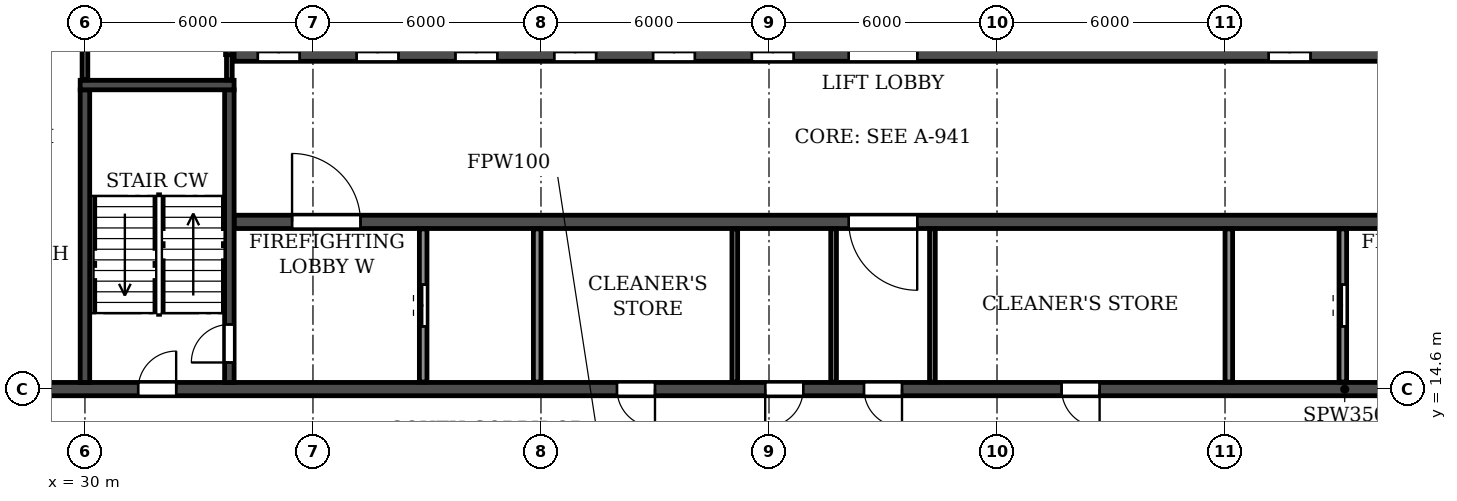
"""IFC4 building model, lengths in metres.
Left out: names, types, materials, properties, quantities, classifications, styles, units other than length and angle.
Written with IfcOpenShell. Run it as: python <this file> out.ifc"""

import sys

from ifc_helpers import new_model, si_unit, direction, frame, frame_2d, origin, place, context, subcontext, project, spatial, rectangle, extrude, element, fill, save


model = new_model("IFC4")
c1 = context("Model", 3, precision=1e-05, world=origin(), true_north=direction((0.0, 1.0)))
c2 = subcontext(c1, "Body", "Model", "MODEL_VIEW")
j1 = project(units=[si_unit("LENGTHUNIT", "METRE"), si_unit("PLANEANGLEUNIT", "RADIAN")], contexts=[c1])
p1 = place(None, origin())
s1 = spatial("IfcSite", under=j1, at=p1, CompositionType="ELEMENT")
p2 = place(p1, origin())
s2 = spatial("IfcBuilding", under=s1, at=p2, CompositionType="ELEMENT")
p3 = place(p2, frame((0.0, 0.0, 241.2)))
s3 = spatial("IfcBuildingStorey", under=s2, at=p3, CompositionType="ELEMENT", Elevation=241.2)
p4 = place(p3, frame((18.2, 14.6, 0.0), z_axis=(0.0, 0.0, 1.0), x_axis=(1.0, 0.0, 0.0)))
e1 = element("IfcWall", 1, at=p4, inside=s3, PredefinedType="SOLIDWALL", context=c2, shape_type="SweptSolid", body=[
    extrude(rectangle(XDim=65.6, YDim=0.35, at=frame_2d((32.8, 0.0))), origin(), (0.0, 0.0, 1.0), 3.08),
])
p5 = place(p4, frame((0.7, 0.0, 0.0)))
e2 = element("IfcOpeningElement", 2, at=p5, cuts=e1, PredefinedType="OPENING", context=c2, shape_type="SweptSolid", body=[
    extrude(rectangle(XDim=1.0, YDim=2.1, at=frame_2d((0.5, 1.05))), frame((0.0, 0.185, 0.0), z_axis=(0.0, -1.0, 0.0), x_axis=(1.0, 0.0, 0.0)), (0.0, 0.0, 1.0), 0.37),
])
p6 = place(p4, frame((8.6, 0.0, 0.0)))
e3 = element("IfcOpeningElement", 3, at=p6, cuts=e1, PredefinedType="OPENING", context=c2, shape_type="SweptSolid", body=[
    extrude(rectangle(XDim=1.0, YDim=2.1, at=frame_2d((0.5, 1.05))), frame((0.0, 0.185, 0.0), z_axis=(0.0, -1.0, 0.0), x_axis=(1.0, 0.0, 0.0)), (0.0, 0.0, 1.0), 0.37),
])
p7 = place(p4, frame((13.2, 0.0, 0.0)))
e4 = element("IfcOpeningElement", 4, at=p7, cuts=e1, PredefinedType="OPENING", context=c2, shape_type="SweptSolid", body=[
    extrude(rectangle(XDim=1.0, YDim=2.1, at=frame_2d((0.5, 1.05))), frame((0.0, 0.185, 0.0), z_axis=(0.0, -1.0, 0.0), x_axis=(1.0, 0.0, 0.0)), (0.0, 0.0, 1.0), 0.37),
])
p8 = place(p4, frame((25.8, 0.0, 0.0)))
e5 = element("IfcOpeningElement", 5, at=p8, cuts=e1, PredefinedType="OPENING", context=c2, shape_type="SweptSolid", body=[
    extrude(rectangle(XDim=1.0, YDim=2.1, at=frame_2d((0.5, 1.05))), frame((0.0, 0.185, 0.0), z_axis=(0.0, -1.0, 0.0), x_axis=(1.0, 0.0, 0.0)), (0.0, 0.0, 1.0), 0.37),
])
p9 = place(p4, frame((29.7, 0.0, 0.0)))
e6 = element("IfcOpeningElement", 6, at=p9, cuts=e1, PredefinedType="OPENING", context=c2, shape_type="SweptSolid", body=[
    extrude(rectangle(XDim=1.0, YDim=2.1, at=frame_2d((0.5, 1.05))), frame((0.0, 0.185, 0.0), z_axis=(0.0, -1.0, 0.0), x_axis=(1.0, 0.0, 0.0)), (0.0, 0.0, 1.0), 0.37),
])
p10 = place(p4, frame((32.3, 0.0, 0.0)))
e7 = element("IfcOpeningElement", 7, at=p10, cuts=e1, PredefinedType="OPENING", context=c2, shape_type="SweptSolid", body=[
    extrude(rectangle(XDim=1.0, YDim=2.1, at=frame_2d((0.5, 1.05))), frame((0.0, 0.185, 0.0), z_axis=(0.0, -1.0, 0.0), x_axis=(1.0, 0.0, 0.0)), (0.0, 0.0, 1.0), 0.37),
])
p11 = place(p4, frame((37.5, 0.0, 0.0)))
e8 = element("IfcOpeningElement", 8, at=p11, cuts=e1, PredefinedType="OPENING", context=c2, shape_type="SweptSolid", body=[
    extrude(rectangle(XDim=1.0, YDim=2.1, at=frame_2d((0.5, 1.05))), frame((0.0, 0.185, 0.0), z_axis=(0.0, -1.0, 0.0), x_axis=(1.0, 0.0, 0.0)), (0.0, 0.0, 1.0), 0.37),
])
p12 = place(p4, frame((51.4, 0.0, 0.0)))
e9 = element("IfcOpeningElement", 9, at=p12, cuts=e1, PredefinedType="OPENING", context=c2, shape_type="SweptSolid", body=[
    extrude(rectangle(XDim=1.0, YDim=2.1, at=frame_2d((0.5, 1.05))), frame((0.0, 0.185, 0.0), z_axis=(0.0, -1.0, 0.0), x_axis=(1.0, 0.0, 0.0)), (0.0, 0.0, 1.0), 0.37),
])
p13 = place(p4, frame((56.0, 0.0, 0.0)))
e10 = element("IfcOpeningElement", 10, at=p13, cuts=e1, PredefinedType="OPENING", context=c2, shape_type="SweptSolid", body=[
    extrude(rectangle(XDim=1.0, YDim=2.1, at=frame_2d((0.5, 1.05))), frame((0.0, 0.185, 0.0), z_axis=(0.0, -1.0, 0.0), x_axis=(1.0, 0.0, 0.0)), (0.0, 0.0, 1.0), 0.37),
])
p14 = place(p4, frame((63.9, 0.0, 0.0)))
e11 = element("IfcOpeningElement", 11, at=p14, cuts=e1, PredefinedType="OPENING", context=c2, shape_type="SweptSolid", body=[
    extrude(rectangle(XDim=1.0, YDim=2.1, at=frame_2d((0.5, 1.05))), frame((0.0, 0.185, 0.0), z_axis=(0.0, -1.0, 0.0), x_axis=(1.0, 0.0, 0.0)), (0.0, 0.0, 1.0), 0.37),
])
p15 = place(p3, frame((33.925, 19.0, 0.0), z_axis=(0.0, 0.0, 1.0), x_axis=(1.0, 0.0, 0.0)))
e12 = element("IfcWall", 12, at=p15, inside=s3, PredefinedType="SOLIDWALL", context=c2, shape_type="SweptSolid", body=[
    extrude(rectangle(XDim=34.15, YDim=0.35, at=frame_2d((17.075, 0.0))), origin(), (0.0, 0.0, 1.0), 3.08),
])
p16 = place(p15, frame((16.175, 0.0, 0.0)))
e13 = element("IfcOpeningElement", 13, at=p16, cuts=e12, PredefinedType="OPENING", context=c2, shape_type="SweptSolid", body=[
    extrude(rectangle(XDim=1.8, YDim=2.1, at=frame_2d((0.9, 1.05))), frame((0.0, 0.185, 0.0), z_axis=(0.0, -1.0, 0.0), x_axis=(1.0, 0.0, 0.0)), (0.0, 0.0, 1.0), 0.37),
])
p17 = place(p15, frame((1.525, 0.0, 0.0)))
e14 = element("IfcOpeningElement", 14, at=p17, cuts=e12, PredefinedType="OPENING", context=c2, shape_type="SweptSolid", body=[
    extrude(rectangle(XDim=1.8, YDim=2.1, at=frame_2d((0.9, 1.05))), frame((0.0, 0.185, 0.0), z_axis=(0.0, -1.0, 0.0), x_axis=(1.0, 0.0, 0.0)), (0.0, 0.0, 1.0), 0.37),
])
p18 = place(p15, frame((30.825, 0.0, 0.0)))
e15 = element("IfcOpeningElement", 15, at=p18, cuts=e12, PredefinedType="OPENING", context=c2, shape_type="SweptSolid", body=[
    extrude(rectangle(XDim=1.8, YDim=2.1, at=frame_2d((0.9, 1.05))), frame((0.0, 0.185, 0.0), z_axis=(0.0, -1.0, 0.0), x_axis=(1.0, 0.0, 0.0)), (0.0, 0.0, 1.0), 0.37),
])
p19 = place(p3, frame((33.925, 23.4, 0.0), z_axis=(0.0, 0.0, 1.0), x_axis=(1.0, 0.0, 0.0)))
e16 = element("IfcWall", 16, at=p19, inside=s3, PredefinedType="SOLIDWALL", context=c2, shape_type="SweptSolid", body=[
    extrude(rectangle(XDim=34.15, YDim=0.35, at=frame_2d((17.075, 0.0))), origin(), (0.0, 0.0, 1.0), 3.08),
])
p20 = place(p19, frame((16.175, 0.0, 0.0)))
e17 = element("IfcOpeningElement", 17, at=p20, cuts=e16, PredefinedType="OPENING", context=c2, shape_type="SweptSolid", body=[
    extrude(rectangle(XDim=1.8, YDim=2.1, at=frame_2d((0.9, 1.05))), frame((0.0, 0.185, 0.0), z_axis=(0.0, -1.0, 0.0), x_axis=(1.0, 0.0, 0.0)), (0.0, 0.0, 1.0), 0.37),
])
p21 = place(p19, frame((0.625, 0.0, 0.0)))
e18 = element("IfcOpeningElement", 18, at=p21, cuts=e16, PredefinedType="OPENING", context=c2, shape_type="SweptSolid", body=[
    extrude(rectangle(XDim=1.1, YDim=2.1, at=frame_2d((0.55, 1.05))), frame((0.0, 0.185, 0.0), z_axis=(0.0, -1.0, 0.0), x_axis=(1.0, 0.0, 0.0)), (0.0, 0.0, 1.0), 0.37),
])
p22 = place(p19, frame((3.225, 0.0, 0.0)))
e19 = element("IfcOpeningElement", 19, at=p22, cuts=e16, PredefinedType="OPENING", context=c2, shape_type="SweptSolid", body=[
    extrude(rectangle(XDim=1.1, YDim=2.1, at=frame_2d((0.55, 1.05))), frame((0.0, 0.185, 0.0), z_axis=(0.0, -1.0, 0.0), x_axis=(1.0, 0.0, 0.0)), (0.0, 0.0, 1.0), 0.37),
])
p23 = place(p19, frame((5.825, 0.0, 0.0)))
e20 = element("IfcOpeningElement", 20, at=p23, cuts=e16, PredefinedType="OPENING", context=c2, shape_type="SweptSolid", body=[
    extrude(rectangle(XDim=1.1, YDim=2.1, at=frame_2d((0.55, 1.05))), frame((0.0, 0.185, 0.0), z_axis=(0.0, -1.0, 0.0), x_axis=(1.0, 0.0, 0.0)), (0.0, 0.0, 1.0), 0.37),
])
p24 = place(p19, frame((8.425, 0.0, 0.0)))
e21 = element("IfcOpeningElement", 21, at=p24, cuts=e16, PredefinedType="OPENING", context=c2, shape_type="SweptSolid", body=[
    extrude(rectangle(XDim=1.1, YDim=2.1, at=frame_2d((0.55, 1.05))), frame((0.0, 0.185, 0.0), z_axis=(0.0, -1.0, 0.0), x_axis=(1.0, 0.0, 0.0)), (0.0, 0.0, 1.0), 0.37),
])
p25 = place(p19, frame((11.025, 0.0, 0.0)))
e22 = element("IfcOpeningElement", 22, at=p25, cuts=e16, PredefinedType="OPENING", context=c2, shape_type="SweptSolid", body=[
    extrude(rectangle(XDim=1.1, YDim=2.1, at=frame_2d((0.55, 1.05))), frame((0.0, 0.185, 0.0), z_axis=(0.0, -1.0, 0.0), x_axis=(1.0, 0.0, 0.0)), (0.0, 0.0, 1.0), 0.37),
])
p26 = place(p19, frame((13.625, 0.0, 0.0)))
e23 = element("IfcOpeningElement", 23, at=p26, cuts=e16, PredefinedType="OPENING", context=c2, shape_type="SweptSolid", body=[
    extrude(rectangle(XDim=1.1, YDim=2.1, at=frame_2d((0.55, 1.05))), frame((0.0, 0.185, 0.0), z_axis=(0.0, -1.0, 0.0), x_axis=(1.0, 0.0, 0.0)), (0.0, 0.0, 1.0), 0.37),
])
p27 = place(p19, frame((27.225, 0.0, 0.0)))
e24 = element("IfcOpeningElement", 24, at=p27, cuts=e16, PredefinedType="OPENING", context=c2, shape_type="SweptSolid", body=[
    extrude(rectangle(XDim=1.1, YDim=2.1, at=frame_2d((0.55, 1.05))), frame((0.0, 0.185, 0.0), z_axis=(0.0, -1.0, 0.0), x_axis=(1.0, 0.0, 0.0)), (0.0, 0.0, 1.0), 0.37),
])
p28 = place(p3, frame((30.0, 14.775, 0.0), z_axis=(0.0, 0.0, 1.0), x_axis=(0.0, 1.0, 0.0)))
e25 = element("IfcWall", 25, at=p28, inside=s3, PredefinedType="SOLIDWALL", context=c2, shape_type="SweptSolid", body=[
    extrude(rectangle(XDim=7.7, YDim=0.25, at=frame_2d((3.85, 0.0))), origin(), (0.0, 0.0, 1.0), 3.08),
])
p29 = place(p3, frame((33.8, 14.775, 0.0), z_axis=(0.0, 0.0, 1.0), x_axis=(0.0, 1.0, 0.0)))
e26 = element("IfcWall", 26, at=p29, inside=s3, PredefinedType="SOLIDWALL", context=c2, shape_type="SweptSolid", body=[
    extrude(rectangle(XDim=7.7, YDim=0.25, at=frame_2d((3.85, 0.0))), origin(), (0.0, 0.0, 1.0), 3.08),
])
p30 = place(p29, frame((0.525, 0.0, 0.0)))
e27 = element("IfcOpeningElement", 27, at=p30, cuts=e26, PredefinedType="OPENING", context=c2, shape_type="SweptSolid", body=[
    extrude(rectangle(XDim=1.0, YDim=2.1, at=frame_2d((0.5, 1.05))), frame((0.0, 0.135, 0.0), z_axis=(0.0, -1.0, 0.0), x_axis=(1.0, 0.0, 0.0)), (0.0, 0.0, 1.0), 0.27),
])
p31 = place(p3, frame((29.875, 22.6, 0.0), z_axis=(0.0, 0.0, 1.0), x_axis=(1.0, 0.0, 0.0)))
e28 = element("IfcWall", 28, at=p31, inside=s3, PredefinedType="SOLIDWALL", context=c2, shape_type="SweptSolid", body=[
    extrude(rectangle(XDim=4.05, YDim=0.25, at=frame_2d((2.025, 0.0))), origin(), (0.0, 0.0, 1.0), 3.08),
])
for number, where, z_axis, x_axis in (
    (29, (49.7, 14.785, 0.0), (0.0, 0.0, 1.0), (0.0, 1.0, 0.0)),
    (30, (52.3, 14.785, 0.0), (0.0, 0.0, 1.0), (0.0, 1.0, 0.0)),
    (31, (47.1, 14.785, 0.0), (0.0, 0.0, 1.0), (0.0, 1.0, 0.0)),
):
    element("IfcWall", number, at=place(p3, frame(where, z_axis=z_axis, x_axis=x_axis)), inside=s3, PredefinedType="PARTITIONING", context=c2, shape_type="SweptSolid", body=[
        extrude(rectangle(XDim=4.03, YDim=0.15, at=frame_2d((2.015, 0.0))), origin(), (0.0, 0.0, 1.0), 3.08),
    ])
p32 = place(p3, frame((30.0, 22.735, 0.0), z_axis=(0.0, 0.0, 1.0), x_axis=(0.0, 1.0, 0.0)))
e32 = element("IfcWall", 32, at=p32, inside=s3, PredefinedType="PARTITIONING", context=c2, shape_type="SweptSolid", body=[
    extrude(rectangle(XDim=4.88, YDim=0.15, at=frame_2d((2.44, 0.0))), origin(), (0.0, 0.0, 1.0), 3.08),
])
p33 = place(p3, frame((33.8, 22.735, 0.0), z_axis=(0.0, 0.0, 1.0), x_axis=(0.0, 1.0, 0.0)))
e33 = element("IfcWall", 33, at=p33, inside=s3, PredefinedType="PARTITIONING", context=c2, shape_type="SweptSolid", body=[
    extrude(rectangle(XDim=0.665, YDim=0.15, at=frame_2d((0.333, 0.0))), origin(), (0.0, 0.0, 1.0), 3.08),
])
p34 = place(p3, frame((33.8, 23.4, 0.0), z_axis=(0.0, 0.0, 1.0), x_axis=(0.0, 1.0, 0.0)))
e34 = element("IfcWall", 34, at=p34, inside=s3, PredefinedType="PARTITIONING", context=c2, shape_type="SweptSolid", body=[
    extrude(rectangle(XDim=2.7, YDim=0.2, at=frame_2d((1.35, 0.0))), origin(), (0.0, 0.0, 1.0), 3.08),
])
p35 = place(p3, frame((38.9, 14.785, 0.0), z_axis=(0.0, 0.0, 1.0), x_axis=(0.0, 1.0, 0.0)))
e35 = element("IfcWall", 35, at=p35, inside=s3, PredefinedType="PARTITIONING", context=c2, shape_type="SweptSolid", body=[
    extrude(rectangle(XDim=4.03, YDim=0.2, at=frame_2d((2.015, 0.0))), origin(), (0.0, 0.0, 1.0), 3.08),
])
p36 = place(p35, frame((1.465, 0.0, 0.0)))
e36 = element("IfcOpeningElement", 36, at=p36, cuts=e35, PredefinedType="OPENING", context=c2, shape_type="SweptSolid", body=[
    extrude(rectangle(XDim=1.1, YDim=2.1, at=frame_2d((0.55, 1.05))), frame((0.0, 0.11, 0.0), z_axis=(0.0, -1.0, 0.0), x_axis=(1.0, 0.0, 0.0)), (0.0, 0.0, 1.0), 0.22),
])
for number, where, z_axis, x_axis in (
    (37, (41.9, 14.785, 0.0), (0.0, 0.0, 1.0), (0.0, 1.0, 0.0)),
    (38, (60.1, 14.785, 0.0), (0.0, 0.0, 1.0), (0.0, 1.0, 0.0)),
):
    element("IfcWall", number, at=place(p3, frame(where, z_axis=z_axis, x_axis=x_axis)), inside=s3, PredefinedType="PARTITIONING", context=c2, shape_type="SweptSolid", body=[
        extrude(rectangle(XDim=4.03, YDim=0.2, at=frame_2d((2.015, 0.0))), origin(), (0.0, 0.0, 1.0), 3.08),
    ])
p37 = place(p3, frame((63.1, 14.785, 0.0), z_axis=(0.0, 0.0, 1.0), x_axis=(0.0, 1.0, 0.0)))
e39 = element("IfcWall", 39, at=p37, inside=s3, PredefinedType="PARTITIONING", context=c2, shape_type="SweptSolid", body=[
    extrude(rectangle(XDim=4.03, YDim=0.2, at=frame_2d((2.015, 0.0))), origin(), (0.0, 0.0, 1.0), 3.08),
])
p38 = place(p37, frame((1.465, 0.0, 0.0)))
e40 = element("IfcOpeningElement", 40, at=p38, cuts=e39, PredefinedType="OPENING", context=c2, shape_type="SweptSolid", body=[
    extrude(rectangle(XDim=1.1, YDim=2.1, at=frame_2d((0.55, 1.05))), frame((0.0, 0.11, 0.0), z_axis=(0.0, -1.0, 0.0), x_axis=(1.0, 0.0, 0.0)), (0.0, 0.0, 1.0), 0.22),
])
p39 = place(p7, origin())
e41 = element("IfcDoor", 41, at=p39, inside=s3, OperationType="SINGLE_SWING_RIGHT", PredefinedType="DOOR", context=c2, shape_type="SweptSolid", body=[
    extrude(rectangle(XDim=1.0, YDim=2.1, at=frame_2d((0.5, 1.05))), frame((0.0, 0.025, 0.0), z_axis=(0.0, -1.0, 0.0), x_axis=(1.0, 0.0, 0.0)), (0.0, 0.0, 1.0), 0.05),
])
fill(e4, e41)
p40 = place(p8, frame((1.0, 0.0, 0.0), z_axis=(0.0, 0.0, 1.0), x_axis=(-1.0, 0.0, 0.0)))
e42 = element("IfcDoor", 42, at=p40, inside=s3, OperationType="SINGLE_SWING_LEFT", PredefinedType="DOOR", context=c2, shape_type="SweptSolid", body=[
    extrude(rectangle(XDim=1.0, YDim=2.1, at=frame_2d((0.5, 1.05))), frame((0.0, 0.025, 0.0), z_axis=(0.0, -1.0, 0.0), x_axis=(1.0, 0.0, 0.0)), (0.0, 0.0, 1.0), 0.05),
])
fill(e5, e42)
p41 = place(p9, frame((1.0, 0.0, 0.0), z_axis=(0.0, 0.0, 1.0), x_axis=(-1.0, 0.0, 0.0)))
e43 = element("IfcDoor", 43, at=p41, inside=s3, OperationType="SINGLE_SWING_RIGHT", PredefinedType="DOOR", context=c2, shape_type="SweptSolid", body=[
    extrude(rectangle(XDim=1.0, YDim=2.1, at=frame_2d((0.5, 1.05))), frame((0.0, 0.025, 0.0), z_axis=(0.0, -1.0, 0.0), x_axis=(1.0, 0.0, 0.0)), (0.0, 0.0, 1.0), 0.05),
])
fill(e6, e43)
p42 = place(p10, frame((1.0, 0.0, 0.0), z_axis=(0.0, 0.0, 1.0), x_axis=(-1.0, 0.0, 0.0)))
e44 = element("IfcDoor", 44, at=p42, inside=s3, OperationType="SINGLE_SWING_LEFT", PredefinedType="DOOR", context=c2, shape_type="SweptSolid", body=[
    extrude(rectangle(XDim=1.0, YDim=2.1, at=frame_2d((0.5, 1.05))), frame((0.0, 0.025, 0.0), z_axis=(0.0, -1.0, 0.0), x_axis=(1.0, 0.0, 0.0)), (0.0, 0.0, 1.0), 0.05),
])
fill(e7, e44)
p43 = place(p11, frame((1.0, 0.0, 0.0), z_axis=(0.0, 0.0, 1.0), x_axis=(-1.0, 0.0, 0.0)))
e45 = element("IfcDoor", 45, at=p43, inside=s3, OperationType="SINGLE_SWING_LEFT", PredefinedType="DOOR", context=c2, shape_type="SweptSolid", body=[
    extrude(rectangle(XDim=1.0, YDim=2.1, at=frame_2d((0.5, 1.05))), frame((0.0, 0.025, 0.0), z_axis=(0.0, -1.0, 0.0), x_axis=(1.0, 0.0, 0.0)), (0.0, 0.0, 1.0), 0.05),
])
fill(e8, e45)
p44 = place(p38, origin())
e46 = element("IfcDoor", 46, at=p44, inside=s3, OperationType="DOUBLE_DOOR_SLIDING", PredefinedType="DOOR", context=c2, shape_type="SweptSolid", body=[
    extrude(rectangle(XDim=1.1, YDim=2.1, at=frame_2d((0.55, 1.05))), frame((0.0, 0.025, 0.0), z_axis=(0.0, -1.0, 0.0), x_axis=(1.0, 0.0, 0.0)), (0.0, 0.0, 1.0), 0.05),
])
fill(e40, e46)
p45 = place(p30, origin())
e47 = element("IfcDoor", 47, at=p45, inside=s3, OperationType="SINGLE_SWING_LEFT", PredefinedType="DOOR", context=c2, shape_type="SweptSolid", body=[
    extrude(rectangle(XDim=1.0, YDim=2.1, at=frame_2d((0.5, 1.05))), frame((0.0, 0.025, 0.0), z_axis=(0.0, -1.0, 0.0), x_axis=(1.0, 0.0, 0.0)), (0.0, 0.0, 1.0), 0.05),
])
fill(e27, e47)
p46 = place(p36, origin())
e48 = element("IfcDoor", 48, at=p46, inside=s3, OperationType="DOUBLE_DOOR_SLIDING", PredefinedType="DOOR", context=c2, shape_type="SweptSolid", body=[
    extrude(rectangle(XDim=1.1, YDim=2.1, at=frame_2d((0.55, 1.05))), frame((0.0, 0.025, 0.0), z_axis=(0.0, -1.0, 0.0), x_axis=(1.0, 0.0, 0.0)), (0.0, 0.0, 1.0), 0.05),
])
fill(e36, e48)
p47 = place(p20, origin())
e49 = element("IfcDoor", 49, at=p47, inside=s3, OperationType="DOUBLE_DOOR_SINGLE_SWING", PredefinedType="DOOR", context=c2, shape_type="SweptSolid", body=[
    extrude(rectangle(XDim=1.8, YDim=2.1, at=frame_2d((0.9, 1.05))), frame((0.0, 0.025, 0.0), z_axis=(0.0, -1.0, 0.0), x_axis=(1.0, 0.0, 0.0)), (0.0, 0.0, 1.0), 0.05),
])
fill(e17, e49)
p48 = place(p16, frame((1.8, 0.0, 0.0), z_axis=(0.0, 0.0, 1.0), x_axis=(-1.0, 0.0, 0.0)))
e50 = element("IfcDoor", 50, at=p48, inside=s3, OperationType="DOUBLE_DOOR_SINGLE_SWING", PredefinedType="DOOR", context=c2, shape_type="SweptSolid", body=[
    extrude(rectangle(XDim=1.8, YDim=2.1, at=frame_2d((0.9, 1.05))), frame((0.0, 0.025, 0.0), z_axis=(0.0, -1.0, 0.0), x_axis=(1.0, 0.0, 0.0)), (0.0, 0.0, 1.0), 0.05),
])
fill(e13, e50)
p49 = place(p21, origin())
e51 = element("IfcDoor", 51, at=p49, inside=s3, OperationType="DOUBLE_DOOR_SLIDING", PredefinedType="DOOR", context=c2, shape_type="SweptSolid", body=[
    extrude(rectangle(XDim=1.1, YDim=2.1, at=frame_2d((0.55, 1.05))), frame((0.0, 0.025, 0.0), z_axis=(0.0, -1.0, 0.0), x_axis=(1.0, 0.0, 0.0)), (0.0, 0.0, 1.0), 0.05),
])
fill(e18, e51)
p50 = place(p17, origin())
e52 = element("IfcDoor", 52, at=p50, inside=s3, OperationType="DOUBLE_DOOR_SINGLE_SWING", PredefinedType="DOOR", context=c2, shape_type="SweptSolid", body=[
    extrude(rectangle(XDim=1.8, YDim=2.1, at=frame_2d((0.9, 1.05))), frame((0.0, 0.025, 0.0), z_axis=(0.0, -1.0, 0.0), x_axis=(1.0, 0.0, 0.0)), (0.0, 0.0, 1.0), 0.05),
])
fill(e14, e52)
p51 = place(p22, origin())
e53 = element("IfcDoor", 53, at=p51, inside=s3, OperationType="DOUBLE_DOOR_SLIDING", PredefinedType="DOOR", context=c2, shape_type="SweptSolid", body=[
    extrude(rectangle(XDim=1.1, YDim=2.1, at=frame_2d((0.55, 1.05))), frame((0.0, 0.025, 0.0), z_axis=(0.0, -1.0, 0.0), x_axis=(1.0, 0.0, 0.0)), (0.0, 0.0, 1.0), 0.05),
])
fill(e19, e53)
p52 = place(p23, origin())
e54 = element("IfcDoor", 54, at=p52, inside=s3, OperationType="DOUBLE_DOOR_SLIDING", PredefinedType="DOOR", context=c2, shape_type="SweptSolid", body=[
    extrude(rectangle(XDim=1.1, YDim=2.1, at=frame_2d((0.55, 1.05))), frame((0.0, 0.025, 0.0), z_axis=(0.0, -1.0, 0.0), x_axis=(1.0, 0.0, 0.0)), (0.0, 0.0, 1.0), 0.05),
])
fill(e20, e54)
p53 = place(p24, origin())
e55 = element("IfcDoor", 55, at=p53, inside=s3, OperationType="DOUBLE_DOOR_SLIDING", PredefinedType="DOOR", context=c2, shape_type="SweptSolid", body=[
    extrude(rectangle(XDim=1.1, YDim=2.1, at=frame_2d((0.55, 1.05))), frame((0.0, 0.025, 0.0), z_axis=(0.0, -1.0, 0.0), x_axis=(1.0, 0.0, 0.0)), (0.0, 0.0, 1.0), 0.05),
])
fill(e21, e55)
p54 = place(p25, origin())
e56 = element("IfcDoor", 56, at=p54, inside=s3, OperationType="DOUBLE_DOOR_SLIDING", PredefinedType="DOOR", context=c2, shape_type="SweptSolid", body=[
    extrude(rectangle(XDim=1.1, YDim=2.1, at=frame_2d((0.55, 1.05))), frame((0.0, 0.025, 0.0), z_axis=(0.0, -1.0, 0.0), x_axis=(1.0, 0.0, 0.0)), (0.0, 0.0, 1.0), 0.05),
])
fill(e22, e56)
p55 = place(p26, origin())
e57 = element("IfcDoor", 57, at=p55, inside=s3, OperationType="DOUBLE_DOOR_SLIDING", PredefinedType="DOOR", context=c2, shape_type="SweptSolid", body=[
    extrude(rectangle(XDim=1.1, YDim=2.1, at=frame_2d((0.55, 1.05))), frame((0.0, 0.025, 0.0), z_axis=(0.0, -1.0, 0.0), x_axis=(1.0, 0.0, 0.0)), (0.0, 0.0, 1.0), 0.05),
])
fill(e23, e57)
p56 = place(p27, origin())
e58 = element("IfcDoor", 58, at=p56, inside=s3, OperationType="DOUBLE_DOOR_SLIDING", PredefinedType="DOOR", context=c2, shape_type="SweptSolid", body=[
    extrude(rectangle(XDim=1.1, YDim=2.1, at=frame_2d((0.55, 1.05))), frame((0.0, 0.025, 0.0), z_axis=(0.0, -1.0, 0.0), x_axis=(1.0, 0.0, 0.0)), (0.0, 0.0, 1.0), 0.05),
])
fill(e24, e58)
save(model, sys.argv[1])
